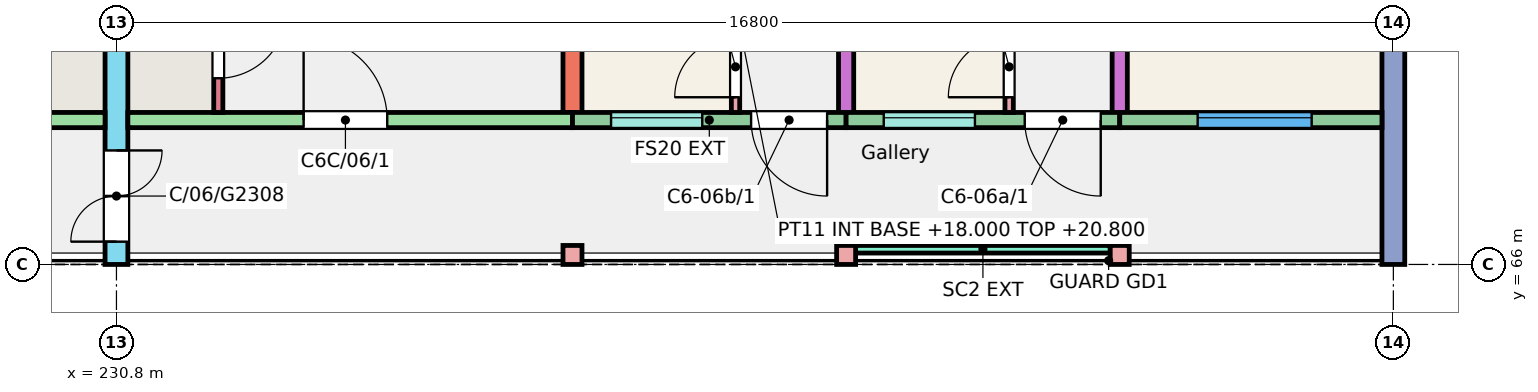
"""IFC4 building model, lengths in metres.
Left out: names, types, materials, properties, quantities, classifications, styles, units other than length and angle.
Written with IfcOpenShell. Run it as: python <this file> out.ifc"""

import sys

from ifc_helpers import new_model, si_unit, direction, frame, frame_2d, origin, origin_2d, place, context, subcontext, project, spatial, rectangle, extrude, element, fill, save


model = new_model("IFC4")
c1 = context("Model", 3, precision=1e-05, world=origin(), true_north=direction((0.0, 1.0)))
c2 = subcontext(c1, "Body", "Model", "MODEL_VIEW")
j1 = project(units=[si_unit("LENGTHUNIT", "METRE"), si_unit("PLANEANGLEUNIT", "RADIAN")], contexts=[c1])
p1 = place(None, origin())
s1 = spatial("IfcSite", under=j1, at=p1, CompositionType="ELEMENT")
p2 = place(p1, origin())
s2 = spatial("IfcBuilding", under=s1, at=p2, CompositionType="ELEMENT")
p3 = place(p2, frame((0.0, 0.0, 18.0)))
s3 = spatial("IfcBuildingStorey", under=s2, at=p3, CompositionType="ELEMENT", Elevation=18.0)
p4 = place(p3, frame((230.8, 66.0, 0.0), z_axis=(0.0, 0.0, 1.0), x_axis=(0.0, 1.0, 0.0)))
e1 = element("IfcWall", 1, at=p4, inside=s3, PredefinedType="SHEAR", context=c2, shape_type="SweptSolid", body=[
    extrude(rectangle(XDim=11.0, YDim=0.3, at=frame_2d((5.5, 0.0))), origin(), (0.0, 0.0, 1.0), 3.0),
])
p5 = place(p4, frame((0.3, 0.0, 0.0)))
e2 = element("IfcOpeningElement", 2, at=p5, cuts=e1, PredefinedType="OPENING", context=c2, shape_type="SweptSolid", body=[
    extrude(rectangle(XDim=1.2, YDim=2.1, at=frame_2d((0.6, 1.05))), frame((0.0, 0.16, 0.0), z_axis=(0.0, -1.0, 0.0), x_axis=(1.0, 0.0, 0.0)), (0.0, 0.0, 1.0), 0.32),
])
p6 = place(p3, frame((236.8, 68.0, 0.0), z_axis=(0.0, 0.0, 1.0), x_axis=(0.0, 1.0, 0.0)))
e3 = element("IfcWall", 3, at=p6, inside=s3, PredefinedType="SHEAR", context=c2, shape_type="SweptSolid", body=[
    extrude(rectangle(XDim=9.0, YDim=0.25, at=frame_2d((4.5, 0.0))), origin(), (0.0, 0.0, 1.0), 3.0),
])
p7 = place(p3, frame((240.4, 68.0, 0.0), z_axis=(0.0, 0.0, 1.0), x_axis=(0.0, 1.0, 0.0)))
e4 = element("IfcWall", 4, at=p7, inside=s3, PredefinedType="SHEAR", context=c2, shape_type="SweptSolid", body=[
    extrude(rectangle(XDim=9.0, YDim=0.2, at=frame_2d((4.5, 0.0))), origin(), (0.0, 0.0, 1.0), 3.0),
])
p8 = place(p3, frame((244.0, 68.0, 0.0), z_axis=(0.0, 0.0, 1.0), x_axis=(0.0, 1.0, 0.0)))
e5 = element("IfcWall", 5, at=p8, inside=s3, PredefinedType="SHEAR", context=c2, shape_type="SweptSolid", body=[
    extrude(rectangle(XDim=9.0, YDim=0.2, at=frame_2d((4.5, 0.0))), origin(), (0.0, 0.0, 1.0), 3.0),
])
p9 = place(p8, frame((2.4, 0.0, 0.0)))
e6 = element("IfcOpeningElement", 6, at=p9, cuts=e5, PredefinedType="OPENING", context=c2, shape_type="SweptSolid", body=[
    extrude(rectangle(XDim=1.2, YDim=2.1, at=frame_2d((0.6, 1.05))), frame((0.0, 0.11, 0.0), z_axis=(0.0, -1.0, 0.0), x_axis=(1.0, 0.0, 0.0)), (0.0, 0.0, 1.0), 0.22),
])
p10 = place(p8, frame((6.4, 0.0, 0.0)))
e7 = element("IfcOpeningElement", 7, at=p10, cuts=e5, PredefinedType="OPENING", context=c2, shape_type="SweptSolid", body=[
    extrude(rectangle(XDim=1.2, YDim=2.1, at=frame_2d((0.6, 1.05))), frame((0.0, 0.11, 0.0), z_axis=(0.0, -1.0, 0.0), x_axis=(1.0, 0.0, 0.0)), (0.0, 0.0, 1.0), 0.22),
])
p11 = place(p3, frame((247.6, 66.0, 0.0), z_axis=(0.0, 0.0, 1.0), x_axis=(0.0, 1.0, 0.0)))
e8 = element("IfcWall", 8, at=p11, inside=s3, PredefinedType="SHEAR", context=c2, shape_type="SweptSolid", body=[
    extrude(rectangle(XDim=11.0, YDim=0.3, at=frame_2d((5.5, 0.0))), origin(), (0.0, 0.0, 1.0), 3.0),
])
p12 = place(p11, frame((3.45, 0.0, 0.9)))
e9 = element("IfcOpeningElement", 9, at=p12, cuts=e8, PredefinedType="OPENING", context=c2, shape_type="SweptSolid", body=[
    extrude(rectangle(XDim=1.5, YDim=1.5, at=frame_2d((0.75, 0.75))), frame((0.0, 0.16, 0.0), z_axis=(0.0, -1.0, 0.0), x_axis=(1.0, 0.0, 0.0)), (0.0, 0.0, 1.0), 0.32),
])
p13 = place(p11, frame((7.855, 0.0, 0.9)))
e10 = element("IfcOpeningElement", 10, at=p13, cuts=e8, PredefinedType="OPENING", context=c2, shape_type="SweptSolid", body=[
    extrude(rectangle(XDim=1.8, YDim=1.5, at=frame_2d((0.9, 0.75))), frame((0.0, 0.16, 0.0), z_axis=(0.0, -1.0, 0.0), x_axis=(1.0, 0.0, 0.0)), (0.0, 0.0, 1.0), 0.32),
])
p14 = place(p3, frame((224.8, 67.9, 0.0), z_axis=(0.0, 0.0, 1.0), x_axis=(1.0, 0.0, 0.0)))
e11 = element("IfcWall", 11, at=p14, inside=s3, PredefinedType="SHEAR", context=c2, shape_type="SweptSolid", body=[
    extrude(rectangle(XDim=5.85, YDim=0.2, at=frame_2d((2.925, 0.0))), origin(), (0.0, 0.0, 1.0), 3.0),
])
p15 = place(p14, frame((2.438, 0.0, 0.0)))
e12 = element("IfcOpeningElement", 12, at=p15, cuts=e11, PredefinedType="OPENING", context=c2, shape_type="SweptSolid", body=[
    extrude(rectangle(XDim=1.1, YDim=2.1, at=frame_2d((0.55, 1.05))), frame((0.0, 0.11, 0.0), z_axis=(0.0, -1.0, 0.0), x_axis=(1.0, 0.0, 0.0)), (0.0, 0.0, 1.0), 0.22),
])
p16 = place(p3, frame((230.95, 67.9, 0.0), z_axis=(0.0, 0.0, 1.0), x_axis=(1.0, 0.0, 0.0)))
e13 = element("IfcWall", 13, at=p16, inside=s3, PredefinedType="SHEAR", context=c2, shape_type="SweptSolid", body=[
    extrude(rectangle(XDim=5.85, YDim=0.2, at=frame_2d((2.925, 0.0))), origin(), (0.0, 0.0, 1.0), 3.0),
])
p17 = place(p16, frame((2.312, 0.0, 0.0)))
e14 = element("IfcOpeningElement", 14, at=p17, cuts=e13, PredefinedType="OPENING", context=c2, shape_type="SweptSolid", body=[
    extrude(rectangle(XDim=1.1, YDim=2.1, at=frame_2d((0.55, 1.05))), frame((0.0, 0.11, 0.0), z_axis=(0.0, -1.0, 0.0), x_axis=(1.0, 0.0, 0.0)), (0.0, 0.0, 1.0), 0.22),
])
p18 = place(p3, frame((232.14, 68.0, 0.0), z_axis=(0.0, 0.0, 1.0), x_axis=(0.0, 1.0, 0.0)))
e15 = element("IfcWall", 15, at=p18, inside=s3, PredefinedType="SHEAR", context=c2, shape_type="SweptSolid", body=[
    extrude(rectangle(XDim=1.72, YDim=0.12, at=frame_2d((0.86, 0.0))), origin(), (0.0, 0.0, 1.0), 3.0),
])
p19 = place(p18, frame((0.45, 0.0, 0.0)))
e16 = element("IfcOpeningElement", 16, at=p19, cuts=e15, PredefinedType="OPENING", context=c2, shape_type="SweptSolid", body=[
    extrude(rectangle(XDim=0.9, YDim=2.1, at=frame_2d((0.45, 1.05))), frame((0.0, 0.07, 0.0), z_axis=(0.0, -1.0, 0.0), x_axis=(1.0, 0.0, 0.0)), (0.0, 0.0, 1.0), 0.14),
])
p20 = place(p3, frame((236.8, 67.9, 0.0), z_axis=(0.0, 0.0, 1.0), x_axis=(1.0, 0.0, 0.0)))
e17 = element("IfcWall", 17, at=p20, inside=s3, PredefinedType="SOLIDWALL", context=c2, shape_type="SweptSolid", body=[
    extrude(rectangle(XDim=3.6, YDim=0.2, at=frame_2d((1.8, 0.0))), origin(), (0.0, 0.0, 1.0), 3.0),
])
p21 = place(p20, frame((0.508, 0.0, 1.1)))
e18 = element("IfcOpeningElement", 18, at=p21, cuts=e17, PredefinedType="OPENING", context=c2, shape_type="SweptSolid", body=[
    extrude(rectangle(XDim=1.2, YDim=1.3, at=frame_2d((0.6, 0.65))), frame((0.0, 0.11, 0.0), z_axis=(0.0, -1.0, 0.0), x_axis=(1.0, 0.0, 0.0)), (0.0, 0.0, 1.0), 0.22),
])
p22 = place(p20, frame((2.35, 0.0, 0.0)))
e19 = element("IfcOpeningElement", 19, at=p22, cuts=e17, PredefinedType="OPENING", context=c2, shape_type="SweptSolid", body=[
    extrude(rectangle(XDim=1.0, YDim=2.1, at=frame_2d((0.5, 1.05))), frame((0.0, 0.11, 0.0), z_axis=(0.0, -1.0, 0.0), x_axis=(1.0, 0.0, 0.0)), (0.0, 0.0, 1.0), 0.22),
])
p23 = place(p3, frame((240.4, 67.9, 0.0), z_axis=(0.0, 0.0, 1.0), x_axis=(1.0, 0.0, 0.0)))
e20 = element("IfcWall", 20, at=p23, inside=s3, PredefinedType="SOLIDWALL", context=c2, shape_type="SweptSolid", body=[
    extrude(rectangle(XDim=3.6, YDim=0.2, at=frame_2d((1.8, 0.0))), origin(), (0.0, 0.0, 1.0), 3.0),
])
p24 = place(p23, frame((0.495, 0.0, 1.1)))
e21 = element("IfcOpeningElement", 21, at=p24, cuts=e20, PredefinedType="OPENING", context=c2, shape_type="SweptSolid", body=[
    extrude(rectangle(XDim=1.2, YDim=1.3, at=frame_2d((0.6, 0.65))), frame((0.0, 0.11, 0.0), z_axis=(0.0, -1.0, 0.0), x_axis=(1.0, 0.0, 0.0)), (0.0, 0.0, 1.0), 0.22),
])
p25 = place(p23, frame((2.35, 0.0, 0.0)))
e22 = element("IfcOpeningElement", 22, at=p25, cuts=e20, PredefinedType="OPENING", context=c2, shape_type="SweptSolid", body=[
    extrude(rectangle(XDim=1.0, YDim=2.1, at=frame_2d((0.5, 1.05))), frame((0.0, 0.11, 0.0), z_axis=(0.0, -1.0, 0.0), x_axis=(1.0, 0.0, 0.0)), (0.0, 0.0, 1.0), 0.22),
])
p26 = place(p3, frame((244.0, 67.9, 0.0), z_axis=(0.0, 0.0, 1.0), x_axis=(1.0, 0.0, 0.0)))
e23 = element("IfcWall", 23, at=p26, inside=s3, PredefinedType="SOLIDWALL", context=c2, shape_type="SweptSolid", body=[
    extrude(rectangle(XDim=3.45, YDim=0.2, at=frame_2d((1.725, 0.0))), origin(), (0.0, 0.0, 1.0), 3.0),
])
p27 = place(p26, frame((1.025, 0.0, 0.9)))
e24 = element("IfcOpeningElement", 24, at=p27, cuts=e23, PredefinedType="OPENING", context=c2, shape_type="SweptSolid", body=[
    extrude(rectangle(XDim=1.5, YDim=1.5, at=frame_2d((0.75, 0.75))), frame((0.0, 0.11, 0.0), z_axis=(0.0, -1.0, 0.0), x_axis=(1.0, 0.0, 0.0)), (0.0, 0.0, 1.0), 0.22),
])
for number, where, z_axis, x_axis in (
    (25, (236.8, 66.125, 0.0), (0.0, 0.0, 1.0), (1.0, 0.0, 0.0)),
    (26, (240.4, 66.125, 0.0), (0.0, 0.0, 1.0), (1.0, 0.0, 0.0)),
    (27, (244.0, 66.125, 0.0), (0.0, 0.0, 1.0), (1.0, 0.0, 0.0)),
):
    element("IfcColumn", number, at=place(p3, frame(where, z_axis=z_axis, x_axis=x_axis)), inside=s3, PredefinedType="COLUMN", context=c2, shape_type="SweptSolid", body=[
        extrude(rectangle(XDim=0.25, YDim=0.25, at=origin_2d()), origin(), (0.0, 0.0, 1.0), 3.0),
    ])
p28 = place(p3, frame((240.525, 66.2, 0.0), z_axis=(0.0, 0.0, 1.0), x_axis=(1.0, 0.0, 0.0)))
e28 = element("IfcWall", 28, at=p28, inside=s3, PredefinedType="SOLIDWALL", context=c2, shape_type="SweptSolid", body=[
    extrude(rectangle(XDim=3.35, YDim=0.1, at=frame_2d((1.675, 0.0))), origin(), (0.0, 0.0, 1.0), 2.45),
])
p29 = place(p3, frame((242.545, 68.0, 0.0), z_axis=(0.0, 0.0, 1.0), x_axis=(0.0, 1.0, 0.0)))
e29 = element("IfcWall", 29, at=p29, inside=s3, PredefinedType="PARTITIONING", context=c2, shape_type="SweptSolid", body=[
    extrude(rectangle(XDim=4.5, YDim=0.11, at=frame_2d((2.25, 0.0))), origin(), (0.0, 0.0, 1.0), 2.8),
])
p30 = place(p29, frame((0.2, 0.0, 0.0)))
e30 = element("IfcOpeningElement", 30, at=p30, cuts=e29, PredefinedType="OPENING", context=c2, shape_type="SweptSolid", body=[
    extrude(rectangle(XDim=0.8, YDim=2.1, at=frame_2d((0.4, 1.05))), frame((0.0, 0.065, 0.0), z_axis=(0.0, -1.0, 0.0), x_axis=(1.0, 0.0, 0.0)), (0.0, 0.0, 1.0), 0.13),
])
p31 = place(p29, frame((3.55, 0.0, 0.0)))
e31 = element("IfcOpeningElement", 31, at=p31, cuts=e29, PredefinedType="OPENING", context=c2, shape_type="SweptSolid", body=[
    extrude(rectangle(XDim=0.8, YDim=2.1, at=frame_2d((0.4, 1.05))), frame((0.0, 0.065, 0.0), z_axis=(0.0, -1.0, 0.0), x_axis=(1.0, 0.0, 0.0)), (0.0, 0.0, 1.0), 0.13),
])
p32 = place(p3, frame((238.945, 68.0, 0.0), z_axis=(0.0, 0.0, 1.0), x_axis=(0.0, 1.0, 0.0)))
e32 = element("IfcWall", 32, at=p32, inside=s3, PredefinedType="PARTITIONING", context=c2, shape_type="SweptSolid", body=[
    extrude(rectangle(XDim=4.7, YDim=0.11, at=frame_2d((2.35, 0.0))), origin(), (0.0, 0.0, 1.0), 2.8),
])
p33 = place(p32, frame((0.2, 0.0, 0.0)))
e33 = element("IfcOpeningElement", 33, at=p33, cuts=e32, PredefinedType="OPENING", context=c2, shape_type="SweptSolid", body=[
    extrude(rectangle(XDim=0.8, YDim=2.1, at=frame_2d((0.4, 1.05))), frame((0.0, 0.065, 0.0), z_axis=(0.0, -1.0, 0.0), x_axis=(1.0, 0.0, 0.0)), (0.0, 0.0, 1.0), 0.13),
])
p34 = place(p32, frame((3.75, 0.0, 0.0)))
e34 = element("IfcOpeningElement", 34, at=p34, cuts=e32, PredefinedType="OPENING", context=c2, shape_type="SweptSolid", body=[
    extrude(rectangle(XDim=0.8, YDim=2.1, at=frame_2d((0.4, 1.05))), frame((0.0, 0.065, 0.0), z_axis=(0.0, -1.0, 0.0), x_axis=(1.0, 0.0, 0.0)), (0.0, 0.0, 1.0), 0.13),
])
p35 = place(p27, origin())
e35 = element("IfcWindow", 35, at=p35, inside=s3, PartitioningType="SINGLE_PANEL", PredefinedType="WINDOW", context=c2, shape_type="SweptSolid", body=[
    extrude(rectangle(XDim=1.5, YDim=1.5, at=frame_2d((0.75, 0.75))), frame((0.0, 0.06, 0.0), z_axis=(0.0, -1.0, 0.0), x_axis=(1.0, 0.0, 0.0)), (0.0, 0.0, 1.0), 0.06),
])
fill(e24, e35)
p36 = place(p24, origin())
e36 = element("IfcWindow", 36, at=p36, inside=s3, PartitioningType="SINGLE_PANEL", PredefinedType="WINDOW", context=c2, shape_type="SweptSolid", body=[
    extrude(rectangle(XDim=1.2, YDim=1.3, at=frame_2d((0.6, 0.65))), frame((0.0, 0.06, 0.0), z_axis=(0.0, -1.0, 0.0), x_axis=(1.0, 0.0, 0.0)), (0.0, 0.0, 1.0), 0.06),
])
fill(e21, e36)
p37 = place(p21, origin())
e37 = element("IfcWindow", 37, at=p37, inside=s3, PartitioningType="SINGLE_PANEL", PredefinedType="WINDOW", context=c2, shape_type="SweptSolid", body=[
    extrude(rectangle(XDim=1.2, YDim=1.3, at=frame_2d((0.6, 0.65))), frame((0.0, 0.06, 0.0), z_axis=(0.0, -1.0, 0.0), x_axis=(1.0, 0.0, 0.0)), (0.0, 0.0, 1.0), 0.06),
])
fill(e18, e37)
p38 = place(p25, origin())
e38 = element("IfcDoor", 38, at=p38, inside=s3, OperationType="SINGLE_SWING_RIGHT", PredefinedType="DOOR", context=c2, shape_type="SweptSolid", body=[
    extrude(rectangle(XDim=1.0, YDim=2.1, at=frame_2d((0.5, 1.05))), frame((0.0, 0.025, 0.0), z_axis=(0.0, -1.0, 0.0), x_axis=(1.0, 0.0, 0.0)), (0.0, 0.0, 1.0), 0.05),
])
fill(e22, e38)
p39 = place(p30, origin())
e39 = element("IfcDoor", 39, at=p39, inside=s3, OperationType="SINGLE_SWING_LEFT", PredefinedType="DOOR", context=c2, shape_type="SweptSolid", body=[
    extrude(rectangle(XDim=0.8, YDim=2.1, at=frame_2d((0.4, 1.05))), frame((0.0, 0.025, 0.0), z_axis=(0.0, -1.0, 0.0), x_axis=(1.0, 0.0, 0.0)), (0.0, 0.0, 1.0), 0.05),
])
fill(e30, e39)
p40 = place(p22, origin())
e40 = element("IfcDoor", 40, at=p40, inside=s3, OperationType="SINGLE_SWING_RIGHT", PredefinedType="DOOR", context=c2, shape_type="SweptSolid", body=[
    extrude(rectangle(XDim=1.0, YDim=2.1, at=frame_2d((0.5, 1.05))), frame((0.0, 0.025, 0.0), z_axis=(0.0, -1.0, 0.0), x_axis=(1.0, 0.0, 0.0)), (0.0, 0.0, 1.0), 0.05),
])
fill(e19, e40)
p41 = place(p33, origin())
e41 = element("IfcDoor", 41, at=p41, inside=s3, OperationType="SINGLE_SWING_LEFT", PredefinedType="DOOR", context=c2, shape_type="SweptSolid", body=[
    extrude(rectangle(XDim=0.8, YDim=2.1, at=frame_2d((0.4, 1.05))), frame((0.0, 0.025, 0.0), z_axis=(0.0, -1.0, 0.0), x_axis=(1.0, 0.0, 0.0)), (0.0, 0.0, 1.0), 0.05),
])
fill(e33, e41)
p42 = place(p17, origin())
e42 = element("IfcDoor", 42, at=p42, inside=s3, OperationType="SINGLE_SWING_LEFT", PredefinedType="DOOR", context=c2, shape_type="SweptSolid", body=[
    extrude(rectangle(XDim=1.1, YDim=2.1, at=frame_2d((0.55, 1.05))), frame((0.0, 0.025, 0.0), z_axis=(0.0, -1.0, 0.0), x_axis=(1.0, 0.0, 0.0)), (0.0, 0.0, 1.0), 0.05),
])
fill(e14, e42)
p43 = place(p19, origin())
e43 = element("IfcDoor", 43, at=p43, inside=s3, OperationType="SINGLE_SWING_RIGHT", PredefinedType="DOOR", context=c2, shape_type="SweptSolid", body=[
    extrude(rectangle(XDim=0.9, YDim=2.1, at=frame_2d((0.45, 1.05))), frame((0.0, 0.025, 0.0), z_axis=(0.0, -1.0, 0.0), x_axis=(1.0, 0.0, 0.0)), (0.0, 0.0, 1.0), 0.05),
])
fill(e16, e43)
p44 = place(p5, origin())
e44 = element("IfcDoor", 44, at=p44, inside=s3, OperationType="DOUBLE_DOOR_SINGLE_SWING", PredefinedType="DOOR", context=c2, shape_type="SweptSolid", body=[
    extrude(rectangle(XDim=1.2, YDim=2.1, at=frame_2d((0.6, 1.05))), frame((0.0, 0.025, 0.0), z_axis=(0.0, -1.0, 0.0), x_axis=(1.0, 0.0, 0.0)), (0.0, 0.0, 1.0), 0.05),
])
fill(e2, e44)
save(model, sys.argv[1])
